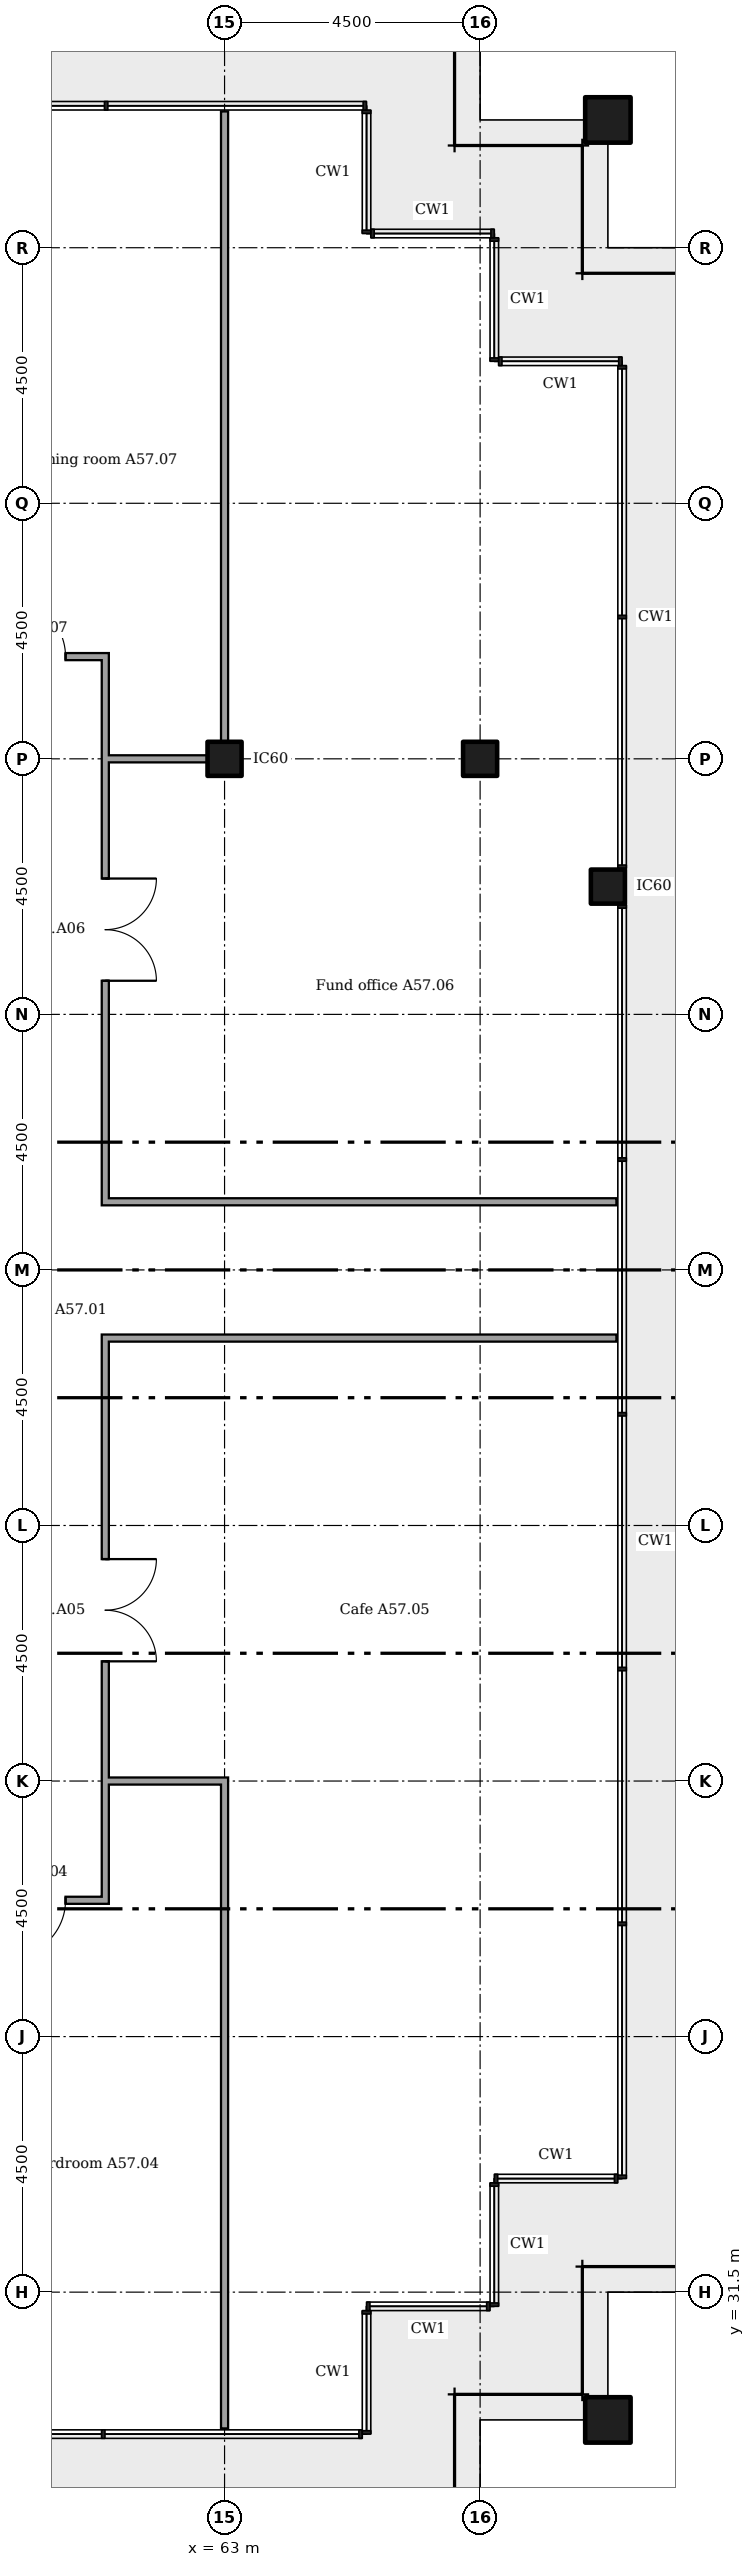
"""IFC4 building model, lengths in metres.
Left out: names, types, materials, properties, quantities, classifications, styles, units other than length and angle.
Written with IfcOpenShell. Run it as: python <this file> out.ifc"""

import sys

from ifc_helpers import new_model, si_unit, direction, frame, frame_2d, origin, origin_2d, place, context, subcontext, project, spatial, rectangle, extrude, element, fill, save


model = new_model("IFC4")
c1 = context("Model", 3, precision=1e-05, world=origin(), true_north=direction((0.0, 1.0)))
c2 = subcontext(c1, "Body", "Model", "MODEL_VIEW")
j1 = project(units=[si_unit("LENGTHUNIT", "METRE"), si_unit("PLANEANGLEUNIT", "RADIAN")], contexts=[c1])
p1 = place(None, origin())
s1 = spatial("IfcSite", under=j1, at=p1, CompositionType="ELEMENT")
p2 = place(p1, origin())
s2 = spatial("IfcBuilding", under=s1, at=p2, CompositionType="ELEMENT")
p3 = place(p2, frame((0.0, 0.0, 224.4)))
s3 = spatial("IfcBuildingStorey", under=s2, at=p3, CompositionType="ELEMENT", Elevation=224.4)
for number, where in (
    (1, (69.75, 29.25, 0.0)),
    (2, (69.75, 69.75, 0.0)),
):
    element("IfcColumn", number, at=place(p3, frame(where)), inside=s3, PredefinedType="COLUMN", context=c2, shape_type="SweptSolid", body=[
        extrude(rectangle(XDim=0.8, YDim=0.8, at=origin_2d()), origin(), (0.0, 0.0, 1.0), 3.6),
    ])
for number, where in (
    (3, (63.0, 58.5, 0.0)),
    (4, (67.5, 58.5, 0.0)),
    (5, (69.75, 56.25, 0.0)),
):
    element("IfcColumn", number, at=place(p3, frame(where)), inside=s3, PredefinedType="COLUMN", context=c2, shape_type="SweptSolid", body=[
        extrude(rectangle(XDim=0.6, YDim=0.6, at=origin_2d()), origin(), (0.0, 0.0, 1.0), 3.6),
    ])
p4 = place(p3, frame((42.5, 38.4, 0.0)))
e6 = element("IfcWall", 6, at=p4, inside=s3, PredefinedType="PARTITIONING", context=c2, shape_type="SweptSolid", body=[
    extrude(rectangle(XDim=18.462, YDim=0.125, at=frame_2d((9.231, 0.0))), origin(), (0.0, 0.0, 1.0), 3.45),
])
p5 = place(p4, frame((0.35, 0.0, 0.0)))
e7 = element("IfcOpeningElement", 7, at=p5, cuts=e6, PredefinedType="OPENING", context=c2, shape_type="SweptSolid", body=[
    extrude(rectangle(XDim=1.8, YDim=2.1, at=frame_2d((0.9, 1.05))), frame((0.0, 0.073, 0.0), z_axis=(0.0, -1.0, 0.0), x_axis=(1.0, 0.0, 0.0)), (0.0, 0.0, 1.0), 0.145),
])
p6 = place(p4, frame((5.258, 0.0, 0.0)))
e8 = element("IfcOpeningElement", 8, at=p6, cuts=e6, PredefinedType="OPENING", context=c2, shape_type="SweptSolid", body=[
    extrude(rectangle(XDim=1.0, YDim=2.1, at=frame_2d((0.5, 1.05))), frame((0.0, 0.073, 0.0), z_axis=(0.0, -1.0, 0.0), x_axis=(1.0, 0.0, 0.0)), (0.0, 0.0, 1.0), 0.145),
])
p7 = place(p4, frame((13.705, 0.0, 0.0)))
e9 = element("IfcOpeningElement", 9, at=p7, cuts=e6, PredefinedType="OPENING", context=c2, shape_type="SweptSolid", body=[
    extrude(rectangle(XDim=1.0, YDim=2.1, at=frame_2d((0.5, 1.05))), frame((0.0, 0.073, 0.0), z_axis=(0.0, -1.0, 0.0), x_axis=(1.0, 0.0, 0.0)), (0.0, 0.0, 1.0), 0.145),
])
p8 = place(p4, frame((16.7, 0.0, 0.0)))
e10 = element("IfcOpeningElement", 10, at=p8, cuts=e6, PredefinedType="OPENING", context=c2, shape_type="SweptSolid", body=[
    extrude(rectangle(XDim=1.0, YDim=2.1, at=frame_2d((0.5, 1.05))), frame((0.0, 0.073, 0.0), z_axis=(0.0, -1.0, 0.0), x_axis=(1.0, 0.0, 0.0)), (0.0, 0.0, 1.0), 0.145),
])
p9 = place(p3, frame((60.9, 40.5, 0.0)))
e11 = element("IfcWall", 11, at=p9, inside=s3, PredefinedType="PARTITIONING", context=c2, shape_type="SweptSolid", body=[
    extrude(rectangle(XDim=2.163, YDim=0.125, at=frame_2d((1.081, 0.0))), origin(), (0.0, 0.0, 1.0), 2.772),
])
for number, where in (
    (12, (60.837, 48.3, 0.0)),
    (13, (60.837, 50.7, 0.0)),
):
    element("IfcWall", number, at=place(p3, frame(where)), inside=s3, PredefinedType="PARTITIONING", context=c2, shape_type="SweptSolid", body=[
        extrude(rectangle(XDim=9.062, YDim=0.125, at=frame_2d((4.531, 0.0))), origin(), (0.0, 0.0, 1.0), 3.45),
    ])
p10 = place(p3, frame((60.9, 58.5, 0.0)))
e14 = element("IfcWall", 14, at=p10, inside=s3, PredefinedType="PARTITIONING", context=c2, shape_type="SweptSolid", body=[
    extrude(rectangle(XDim=2.163, YDim=0.125, at=frame_2d((1.081, 0.0))), origin(), (0.0, 0.0, 1.0), 2.676),
])
p11 = place(p3, frame((42.6, 60.3, 0.0)))
e15 = element("IfcWall", 15, at=p11, inside=s3, PredefinedType="PARTITIONING", context=c2, shape_type="SweptSolid", body=[
    extrude(rectangle(XDim=18.362, YDim=0.125, at=frame_2d((9.181, 0.0))), origin(), (0.0, 0.0, 1.0), 3.45),
])
p12 = place(p11, frame((16.6, 0.0, 0.0)))
e16 = element("IfcOpeningElement", 16, at=p12, cuts=e15, PredefinedType="OPENING", context=c2, shape_type="SweptSolid", body=[
    extrude(rectangle(XDim=1.0, YDim=2.1, at=frame_2d((0.5, 1.05))), frame((0.0, 0.073, 0.0), z_axis=(0.0, -1.0, 0.0), x_axis=(1.0, 0.0, 0.0)), (0.0, 0.0, 1.0), 0.145),
])
p13 = place(p11, frame((12.695, 0.0, 0.0)))
e17 = element("IfcOpeningElement", 17, at=p13, cuts=e15, PredefinedType="OPENING", context=c2, shape_type="SweptSolid", body=[
    extrude(rectangle(XDim=1.0, YDim=2.1, at=frame_2d((0.5, 1.05))), frame((0.0, 0.073, 0.0), z_axis=(0.0, -1.0, 0.0), x_axis=(1.0, 0.0, 0.0)), (0.0, 0.0, 1.0), 0.145),
])
p14 = place(p11, frame((9.105, 0.0, 0.0)))
e18 = element("IfcOpeningElement", 18, at=p14, cuts=e15, PredefinedType="OPENING", context=c2, shape_type="SweptSolid", body=[
    extrude(rectangle(XDim=1.0, YDim=2.1, at=frame_2d((0.5, 1.05))), frame((0.0, 0.073, 0.0), z_axis=(0.0, -1.0, 0.0), x_axis=(1.0, 0.0, 0.0)), (0.0, 0.0, 1.0), 0.145),
])
p15 = place(p11, frame((2.95, 0.0, 0.0)))
e19 = element("IfcOpeningElement", 19, at=p15, cuts=e15, PredefinedType="OPENING", context=c2, shape_type="SweptSolid", body=[
    extrude(rectangle(XDim=1.0, YDim=2.1, at=frame_2d((0.5, 1.05))), frame((0.0, 0.073, 0.0), z_axis=(0.0, -1.0, 0.0), x_axis=(1.0, 0.0, 0.0)), (0.0, 0.0, 1.0), 0.145),
])
p16 = place(p3, frame((60.9, 38.462, 0.0), z_axis=(0.0, 0.0, 1.0), x_axis=(0.0, 1.0, 0.0)))
e20 = element("IfcWall", 20, at=p16, inside=s3, PredefinedType="PARTITIONING", context=c2, shape_type="SweptSolid", body=[
    extrude(rectangle(XDim=9.775, YDim=0.125, at=frame_2d((4.888, 0.0))), origin(), (0.0, 0.0, 1.0), 3.45),
])
p17 = place(p16, frame((4.146, 0.0, 0.0)))
e21 = element("IfcOpeningElement", 21, at=p17, cuts=e20, PredefinedType="OPENING", context=c2, shape_type="SweptSolid", body=[
    extrude(rectangle(XDim=1.8, YDim=2.1, at=frame_2d((0.9, 1.05))), frame((0.0, 0.073, 0.0), z_axis=(0.0, -1.0, 0.0), x_axis=(1.0, 0.0, 0.0)), (0.0, 0.0, 1.0), 0.145),
])
p18 = place(p3, frame((60.9, 50.762, 0.0), z_axis=(0.0, 0.0, 1.0), x_axis=(0.0, 1.0, 0.0)))
e22 = element("IfcWall", 22, at=p18, inside=s3, PredefinedType="PARTITIONING", context=c2, shape_type="SweptSolid", body=[
    extrude(rectangle(XDim=9.475, YDim=0.125, at=frame_2d((4.738, 0.0))), origin(), (0.0, 0.0, 1.0), 3.45),
])
p19 = place(p18, frame((3.83, 0.0, 0.0)))
e23 = element("IfcOpeningElement", 23, at=p19, cuts=e22, PredefinedType="OPENING", context=c2, shape_type="SweptSolid", body=[
    extrude(rectangle(XDim=1.8, YDim=2.1, at=frame_2d((0.9, 1.05))), frame((0.0, 0.073, 0.0), z_axis=(0.0, -1.0, 0.0), x_axis=(1.0, 0.0, 0.0)), (0.0, 0.0, 1.0), 0.145),
])
p20 = place(p3, frame((63.0, 29.1, 0.0), z_axis=(0.0, 0.0, 1.0), x_axis=(0.0, 1.0, 0.0)))
e24 = element("IfcWall", 24, at=p20, inside=s3, PredefinedType="PARTITIONING", context=c2, shape_type="SweptSolid", body=[
    extrude(rectangle(XDim=11.337, YDim=0.125, at=frame_2d((5.669, 0.0))), origin(), (0.0, 0.0, 1.0), 3.45),
])
p21 = place(p3, frame((63.0, 58.562, 0.0), z_axis=(0.0, 0.0, 1.0), x_axis=(0.0, 1.0, 0.0)))
e25 = element("IfcWall", 25, at=p21, inside=s3, PredefinedType="PARTITIONING", context=c2, shape_type="SweptSolid", body=[
    extrude(rectangle(XDim=11.337, YDim=0.125, at=frame_2d((5.669, 0.0))), origin(), (0.0, 0.0, 1.0), 2.772),
])
p22 = place(p8, frame((1.0, 0.0, 0.0), x_axis=(-1.0, 0.0, 0.0)))
e26 = element("IfcDoor", 26, at=p22, inside=s3, OperationType="SINGLE_SWING_LEFT", PredefinedType="DOOR", context=c2, shape_type="SweptSolid", body=[
    extrude(rectangle(XDim=1.0, YDim=2.1, at=frame_2d((0.5, 1.05))), frame((0.0, 0.025, 0.0), z_axis=(0.0, -1.0, 0.0), x_axis=(1.0, 0.0, 0.0)), (0.0, 0.0, 1.0), 0.05),
])
fill(e10, e26)
p23 = place(p17, frame((1.8, 0.0, 0.0), x_axis=(-1.0, 0.0, 0.0)))
e27 = element("IfcDoor", 27, at=p23, inside=s3, OperationType="DOUBLE_DOOR_SINGLE_SWING", PredefinedType="DOOR", context=c2, shape_type="SweptSolid", body=[
    extrude(rectangle(XDim=1.8, YDim=2.1, at=frame_2d((0.9, 1.05))), frame((0.0, 0.025, 0.0), z_axis=(0.0, -1.0, 0.0), x_axis=(1.0, 0.0, 0.0)), (0.0, 0.0, 1.0), 0.05),
])
fill(e21, e27)
p24 = place(p19, frame((1.8, 0.0, 0.0), x_axis=(-1.0, 0.0, 0.0)))
e28 = element("IfcDoor", 28, at=p24, inside=s3, OperationType="DOUBLE_DOOR_SINGLE_SWING", PredefinedType="DOOR", context=c2, shape_type="SweptSolid", body=[
    extrude(rectangle(XDim=1.8, YDim=2.1, at=frame_2d((0.9, 1.05))), frame((0.0, 0.025, 0.0), z_axis=(0.0, -1.0, 0.0), x_axis=(1.0, 0.0, 0.0)), (0.0, 0.0, 1.0), 0.05),
])
fill(e23, e28)
p25 = place(p12, origin())
e29 = element("IfcDoor", 29, at=p25, inside=s3, OperationType="SINGLE_SWING_RIGHT", PredefinedType="DOOR", context=c2, shape_type="SweptSolid", body=[
    extrude(rectangle(XDim=1.0, YDim=2.1, at=frame_2d((0.5, 1.05))), frame((0.0, 0.025, 0.0), z_axis=(0.0, -1.0, 0.0), x_axis=(1.0, 0.0, 0.0)), (0.0, 0.0, 1.0), 0.05),
])
fill(e16, e29)
save(model, sys.argv[1])
